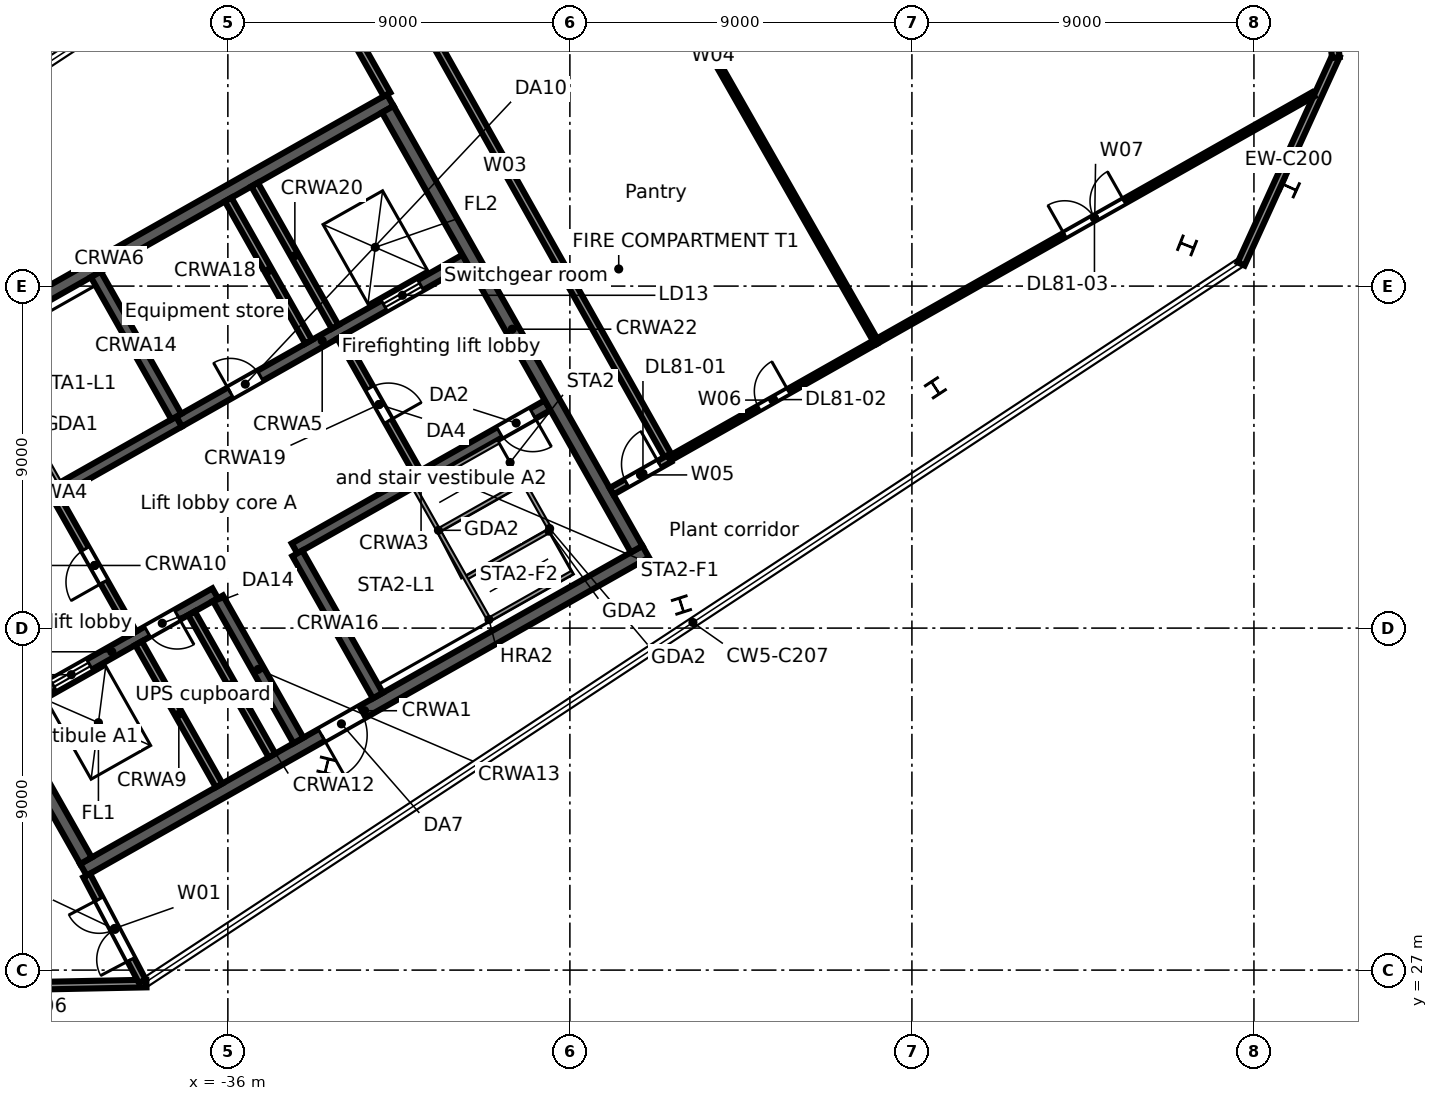
"""IFC4 building model, lengths in metres.
Left out: names, types, materials, properties, quantities, classifications, styles, units other than length and angle.
Written with IfcOpenShell. Run it as: python <this file> out.ifc"""

import sys

from ifc_helpers import new_model, si_unit, direction, frame, frame_2d, origin, origin_2d, place, context, subcontext, project, spatial, rectangle, i_section, extrude, element, fill, save


model = new_model("IFC4")
c1 = context("Model", 3, precision=1e-05, world=origin(), true_north=direction((0.0, 1.0)))
c2 = subcontext(c1, "Body", "Model", "MODEL_VIEW")
j1 = project(units=[si_unit("LENGTHUNIT", "METRE"), si_unit("PLANEANGLEUNIT", "RADIAN")], contexts=[c1])
p1 = place(None, origin())
s1 = spatial("IfcSite", under=j1, at=p1, CompositionType="ELEMENT")
p2 = place(p1, origin())
s2 = spatial("IfcBuilding", under=s1, at=p2, CompositionType="ELEMENT")
p3 = place(p2, frame((0.0, 0.0, 357.7)))
s3 = spatial("IfcBuildingStorey", under=s2, at=p3, CompositionType="ELEMENT", Elevation=357.7)
for number, where, z_axis, x_axis in (
    (1, (-8.058, 47.599, 0.0), (0.0, 0.0, 1.0), (0.415, 0.91, 0.0)),
    (2, (-33.4, 32.374, 0.0), (0.0, 0.0, 1.0), (-0.971, 0.239, 0.0)),
    (3, (-24.065, 36.607, 0.0), (0.0, 0.0, 1.0), (-0.952, -0.307, 0.0)),
    (4, (-17.382, 42.324, 0.0), (0.0, 0.0, 1.0), (0.836, 0.549, 0.0)),
):
    element("IfcColumn", number, at=place(p3, frame(where, z_axis=z_axis, x_axis=x_axis)), inside=s3, PredefinedType="COLUMN", context=c2, shape_type="SweptSolid", body=[
        extrude(i_section(OverallWidth=0.4, OverallDepth=0.4, WebThickness=0.013, FlangeThickness=0.021, FilletRadius=0.022, at=origin_2d()), origin(), (0.0, 0.0, 1.0), 3.3),
    ])
p4 = place(p3, frame((-10.76, 46.071, 0.0), z_axis=(0.0, 0.0, 1.0), x_axis=(0.369033125724, 0.929416242659, 0.0)))
e5 = element("IfcColumn", 5, at=p4, inside=s3, PredefinedType="COLUMN", context=c2, shape_type="SweptSolid", body=[
    extrude(i_section(OverallWidth=0.4, OverallDepth=0.4, WebThickness=0.013, FlangeThickness=0.021, FilletRadius=0.022, at=origin_2d()), origin(), (0.0, 0.0, 1.0), 3.6),
])
p5 = place(p3, frame((-6.834, 51.069, 0.0), z_axis=(0.0, 0.0, 1.0), x_axis=(-0.415043982488, -0.909801347878, 0.0)))
e6 = element("IfcWall", 6, at=p5, inside=s3, PredefinedType="STANDARD", context=c2, shape_type="SweptSolid", body=[
    extrude(rectangle(XDim=6.031, YDim=0.2, at=frame_2d((3.015, 0.0))), origin(), (0.0, 0.0, 1.0), 2.7),
])
p6 = place(p3, frame((-9.114, 67.947, 0.0), z_axis=(0.0, 0.0, 1.0), x_axis=(0.132931254717, -0.991125260257, 0.0)))
e7 = element("IfcWall", 7, at=p6, inside=s3, PredefinedType="STANDARD", context=c2, shape_type="SweptSolid", body=[
    extrude(rectangle(XDim=17.084, YDim=0.2, at=frame_2d((8.542, 0.0))), origin(), (0.0, 0.0, 1.0), 3.3),
])
p7 = place(p3, frame((-38.144, 26.646, 0.0), z_axis=(0.0, 0.0, 1.0), x_axis=(-0.999795108808, -0.020242045449, 0.0)))
e8 = element("IfcWall", 8, at=p7, inside=s3, PredefinedType="STANDARD", context=c2, shape_type="SweptSolid", body=[
    extrude(rectangle(XDim=6.031, YDim=0.2, at=frame_2d((3.015, 0.0))), origin(), (0.0, 0.0, 1.0), 3.3),
])
p8 = place(p3, frame((-39.801, 29.64, 0.0), z_axis=(0.0, 0.0, 1.0), x_axis=(0.870359753402, 0.492416388494, 0.0)))
e9 = element("IfcWall", 9, at=p8, inside=s3, PredefinedType="SOLIDWALL", context=c2, shape_type="SweptSolid", body=[
    extrude(rectangle(XDim=17.0, YDim=0.35, at=frame_2d((8.5, 0.0))), origin(), (0.0, 0.0, 1.0), 3.3),
])
p9 = place(p8, frame((7.2, 0.0, 0.0)))
e10 = element("IfcOpeningElement", 10, at=p9, cuts=e9, PredefinedType="OPENING", context=c2, shape_type="SweptSolid", body=[
    extrude(rectangle(XDim=1.2, YDim=2.1, at=frame_2d((0.6, 1.05))), frame((0.0, 0.185, 0.0), z_axis=(0.0, -1.0, 0.0), x_axis=(1.0, 0.0, 0.0)), (0.0, 0.0, 1.0), 0.37),
])
p10 = place(p3, frame((-41.774, 33.838, 0.0), z_axis=(0.0, 0.0, 1.0), x_axis=(0.870355415866, 0.492424055132, 0.0)))
e11 = element("IfcWall", 11, at=p10, inside=s3, PredefinedType="SOLIDWALL", context=c2, shape_type="SweptSolid", body=[
    extrude(rectangle(XDim=6.25, YDim=0.3, at=frame_2d((3.125, 0.0))), origin(), (0.0, 0.0, 1.0), 3.3),
])
p11 = place(p10, frame((1.35, 0.0, 0.0)))
e12 = element("IfcOpeningElement", 12, at=p11, cuts=e11, PredefinedType="OPENING", context=c2, shape_type="SweptSolid", body=[
    extrude(rectangle(XDim=1.1, YDim=2.1, at=frame_2d((0.55, 1.05))), frame((0.0, 0.16, 0.0), z_axis=(0.0, -1.0, 0.0), x_axis=(1.0, 0.0, 0.0)), (0.0, 0.0, 1.0), 0.32),
])
p12 = place(p10, frame((4.2, 0.0, 0.0)))
e13 = element("IfcOpeningElement", 13, at=p12, cuts=e11, PredefinedType="OPENING", context=c2, shape_type="SweptSolid", body=[
    extrude(rectangle(XDim=0.9, YDim=2.1, at=frame_2d((0.45, 1.05))), frame((0.0, 0.16, 0.0), z_axis=(0.0, -1.0, 0.0), x_axis=(1.0, 0.0, 0.0)), (0.0, 0.0, 1.0), 0.32),
])
p13 = place(p3, frame((-34.245, 38.097, 0.0), z_axis=(0.0, 0.0, 1.0), x_axis=(0.870352347706, 0.49242947804, 0.0)))
e14 = element("IfcWall", 14, at=p13, inside=s3, PredefinedType="SOLIDWALL", context=c2, shape_type="SweptSolid", body=[
    extrude(rectangle(XDim=7.65, YDim=0.3, at=frame_2d((3.825, 0.0))), origin(), (0.0, 0.0, 1.0), 3.3),
])
p14 = place(p13, frame((6.2, 0.0, 0.0)))
e15 = element("IfcOpeningElement", 15, at=p14, cuts=e14, PredefinedType="OPENING", context=c2, shape_type="SweptSolid", body=[
    extrude(rectangle(XDim=1.0, YDim=2.1, at=frame_2d((0.5, 1.05))), frame((0.0, 0.16, 0.0), z_axis=(0.0, -1.0, 0.0), x_axis=(1.0, 0.0, 0.0)), (0.0, 0.0, 1.0), 0.32),
])
p15 = place(p3, frame((-43.94, 37.667, 0.0), z_axis=(0.0, 0.0, 1.0), x_axis=(0.870352347706, 0.49242947804, 0.0)))
e16 = element("IfcWall", 16, at=p15, inside=s3, PredefinedType="SOLIDWALL", context=c2, shape_type="SweptSolid", body=[
    extrude(rectangle(XDim=7.65, YDim=0.3, at=frame_2d((3.825, 0.0))), origin(), (0.0, 0.0, 1.0), 3.3),
])
p16 = place(p15, frame((0.45, 0.0, 0.0)))
e17 = element("IfcOpeningElement", 17, at=p16, cuts=e16, PredefinedType="OPENING", context=c2, shape_type="SweptSolid", body=[
    extrude(rectangle(XDim=1.0, YDim=2.1, at=frame_2d((0.5, 1.05))), frame((0.0, 0.16, 0.0), z_axis=(0.0, -1.0, 0.0), x_axis=(1.0, 0.0, 0.0)), (0.0, 0.0, 1.0), 0.32),
])
p17 = place(p3, frame((-37.282, 41.435, 0.0), z_axis=(0.0, 0.0, 1.0), x_axis=(0.870364588774, 0.492407841741, 0.0)))
e18 = element("IfcWall", 18, at=p17, inside=s3, PredefinedType="SOLIDWALL", context=c2, shape_type="SweptSolid", body=[
    extrude(rectangle(XDim=8.65, YDim=0.3, at=frame_2d((4.325, 0.0))), origin(), (0.0, 0.0, 1.0), 3.3),
])
p18 = place(p17, frame((6.2, 0.0, 0.0)))
e19 = element("IfcOpeningElement", 19, at=p18, cuts=e18, PredefinedType="OPENING", context=c2, shape_type="SweptSolid", body=[
    extrude(rectangle(XDim=1.1, YDim=2.1, at=frame_2d((0.55, 1.05))), frame((0.0, 0.16, 0.0), z_axis=(0.0, -1.0, 0.0), x_axis=(1.0, 0.0, 0.0)), (0.0, 0.0, 1.0), 0.32),
])
p19 = place(p17, frame((1.55, 0.0, 0.0)))
e20 = element("IfcOpeningElement", 20, at=p19, cuts=e18, PredefinedType="OPENING", context=c2, shape_type="SweptSolid", body=[
    extrude(rectangle(XDim=0.9, YDim=2.1, at=frame_2d((0.45, 1.05))), frame((0.0, 0.16, 0.0), z_axis=(0.0, -1.0, 0.0), x_axis=(1.0, 0.0, 0.0)), (0.0, 0.0, 1.0), 0.32),
])
p20 = place(p3, frame((-46.522, 41.521, 0.0), z_axis=(0.0, 0.0, 1.0), x_axis=(0.870359753402, 0.492416388494, 0.0)))
e21 = element("IfcWall", 21, at=p20, inside=s3, PredefinedType="SOLIDWALL", context=c2, shape_type="SweptSolid", body=[
    extrude(rectangle(XDim=17.0, YDim=0.35, at=frame_2d((8.5, 0.0))), origin(), (0.0, 0.0, 1.0), 3.3),
])
p21 = place(p3, frame((-46.284, 41.454, 0.0), z_axis=(0.0, 0.0, 1.0), x_axis=(0.492429810477, -0.870352159619, 0.0)))
e22 = element("IfcWall", 22, at=p21, inside=s3, PredefinedType="SOLIDWALL", context=c2, shape_type="SweptSolid", body=[
    extrude(rectangle(XDim=13.3, YDim=0.35, at=frame_2d((6.65, 0.0))), origin(), (0.0, 0.0, 1.0), 3.3),
])
p22 = place(p3, frame((-38.349, 35.603, 0.0), z_axis=(0.0, 0.0, 1.0), x_axis=(0.492410799949, -0.870362915164, 0.0)))
e23 = element("IfcWall", 23, at=p22, inside=s3, PredefinedType="SOLIDWALL", context=c2, shape_type="SweptSolid", body=[
    extrude(rectangle(XDim=4.3, YDim=0.2, at=frame_2d((2.15, 0.0))), origin(), (0.0, 0.0, 1.0), 3.3),
])
p23 = place(p3, frame((-40.516, 39.433, 0.0), z_axis=(0.0, 0.0, 1.0), x_axis=(0.492453559952, -0.87033872216, 0.0)))
e24 = element("IfcWall", 24, at=p23, inside=s3, PredefinedType="PARTITIONING", context=c2, shape_type="SweptSolid", body=[
    extrude(rectangle(XDim=4.1, YDim=0.2, at=frame_2d((2.05, 0.0))), origin(), (0.0, 0.0, 1.0), 3.3),
])
p24 = place(p23, frame((1.55, 0.0, 0.0)))
e25 = element("IfcOpeningElement", 25, at=p24, cuts=e24, PredefinedType="OPENING", context=c2, shape_type="SweptSolid", body=[
    extrude(rectangle(XDim=1.0, YDim=2.1, at=frame_2d((0.5, 1.05))), frame((0.0, 0.11, 0.0), z_axis=(0.0, -1.0, 0.0), x_axis=(1.0, 0.0, 0.0)), (0.0, 0.0, 1.0), 0.22),
])
p25 = place(p3, frame((-36.956, 36.391, 0.0), z_axis=(0.0, 0.0, 1.0), x_axis=(0.492410799949, -0.870362915164, 0.0)))
e26 = element("IfcWall", 26, at=p25, inside=s3, PredefinedType="SOLIDWALL", context=c2, shape_type="SweptSolid", body=[
    extrude(rectangle(XDim=4.3, YDim=0.2, at=frame_2d((2.15, 0.0))), origin(), (0.0, 0.0, 1.0), 3.3),
])
p26 = place(p3, frame((-36.26, 36.785, 0.0), z_axis=(0.0, 0.0, 1.0), x_axis=(0.492435133428, -0.870349147967, 0.0)))
e27 = element("IfcWall", 27, at=p26, inside=s3, PredefinedType="SOLIDWALL", context=c2, shape_type="SweptSolid", body=[
    extrude(rectangle(XDim=4.3, YDim=0.3, at=frame_2d((2.15, 0.0))), origin(), (0.0, 0.0, 1.0), 3.3),
])
p27 = place(p3, frame((-39.473, 45.308, 0.0), z_axis=(0.0, 0.0, 1.0), x_axis=(0.492410799949, -0.870362915164, 0.0)))
e28 = element("IfcWall", 28, at=p27, inside=s3, PredefinedType="SOLIDWALL", context=c2, shape_type="SweptSolid", body=[
    extrude(rectangle(XDim=4.3, YDim=0.3, at=frame_2d((2.15, 0.0))), origin(), (0.0, 0.0, 1.0), 3.3),
])
p28 = place(p3, frame((-34.171, 37.967, 0.0), z_axis=(0.0, 0.0, 1.0), x_axis=(0.492435133428, -0.870349147967, 0.0)))
e29 = element("IfcWall", 29, at=p28, inside=s3, PredefinedType="SOLIDWALL", context=c2, shape_type="SweptSolid", body=[
    extrude(rectangle(XDim=4.3, YDim=0.3, at=frame_2d((2.15, 0.0))), origin(), (0.0, 0.0, 1.0), 3.3),
])
p29 = place(p3, frame((-35.992, 47.277, 0.0), z_axis=(0.0, 0.0, 1.0), x_axis=(0.492410799949, -0.870362915164, 0.0)))
e30 = element("IfcWall", 30, at=p29, inside=s3, PredefinedType="SOLIDWALL", context=c2, shape_type="SweptSolid", body=[
    extrude(rectangle(XDim=4.3, YDim=0.2, at=frame_2d((2.15, 0.0))), origin(), (0.0, 0.0, 1.0), 3.3),
])
p30 = place(p3, frame((-33.031, 43.667, 0.0), z_axis=(0.0, 0.0, 1.0), x_axis=(0.492408451753, -0.87036424366, 0.0)))
e31 = element("IfcWall", 31, at=p30, inside=s3, PredefinedType="PARTITIONING", context=c2, shape_type="SweptSolid", body=[
    extrude(rectangle(XDim=4.1, YDim=0.2, at=frame_2d((2.05, 0.0))), origin(), (0.0, 0.0, 1.0), 3.3),
])
p31 = place(p30, frame((1.55, 0.0, 0.0)))
e32 = element("IfcOpeningElement", 32, at=p31, cuts=e31, PredefinedType="OPENING", context=c2, shape_type="SweptSolid", body=[
    extrude(rectangle(XDim=1.0, YDim=2.1, at=frame_2d((0.5, 1.05))), frame((0.0, 0.11, 0.0), z_axis=(0.0, -1.0, 0.0), x_axis=(1.0, 0.0, 0.0)), (0.0, 0.0, 1.0), 0.22),
])
p32 = place(p3, frame((-35.296, 47.671, 0.0), z_axis=(0.0, 0.0, 1.0), x_axis=(0.492435133428, -0.870349147967, 0.0)))
e33 = element("IfcWall", 33, at=p32, inside=s3, PredefinedType="SOLIDWALL", context=c2, shape_type="SweptSolid", body=[
    extrude(rectangle(XDim=4.3, YDim=0.2, at=frame_2d((2.15, 0.0))), origin(), (0.0, 0.0, 1.0), 3.3),
])
p33 = place(p3, frame((-31.792, 49.653, 0.0), z_axis=(0.0, 0.0, 1.0), x_axis=(0.492421943245, -0.870356610712, 0.0)))
e34 = element("IfcWall", 34, at=p33, inside=s3, PredefinedType="SOLIDWALL", context=c2, shape_type="SweptSolid", body=[
    extrude(rectangle(XDim=13.3, YDim=0.35, at=frame_2d((6.65, 0.0))), origin(), (0.0, 0.0, 1.0), 3.3),
])
p34 = place(p3, frame((-39.715, 29.488, 0.0), z_axis=(0.0, 0.0, 1.0), x_axis=(0.465711249011, -0.884936739289, 0.0)))
e35 = element("IfcWall", 35, at=p34, inside=s3, PredefinedType="PARTITIONING", context=c2, shape_type="SweptSolid", body=[
    extrude(rectangle(XDim=3.146, YDim=0.2, at=frame_2d((1.573, 0.0))), origin(), (0.0, 0.0, 1.0), 2.68),
])
p35 = place(p34, frame((0.7, 0.0, 0.0)))
e36 = element("IfcOpeningElement", 36, at=p35, cuts=e35, PredefinedType="OPENING", context=c2, shape_type="SweptSolid", body=[
    extrude(rectangle(XDim=1.8, YDim=2.1, at=frame_2d((0.9, 1.05))), frame((0.0, 0.11, 0.0), z_axis=(0.0, -1.0, 0.0), x_axis=(1.0, 0.0, 0.0)), (0.0, 0.0, 1.0), 0.22),
])
p36 = place(p3, frame((-34.544, 54.873, 0.0), z_axis=(0.0, 0.0, 1.0), x_axis=(0.492390708412, -0.870374281714, 0.0)))
e37 = element("IfcWall", 37, at=p36, inside=s3, PredefinedType="PARTITIONING", context=c2, shape_type="SweptSolid", body=[
    extrude(rectangle(XDim=5.548, YDim=0.2, at=frame_2d((2.774, 0.0))), origin(), (0.0, 0.0, 1.0), 2.18),
])
p37 = place(p3, frame((-33.042, 55.86, 0.0), z_axis=(0.0, 0.0, 1.0), x_axis=(0.490288138745, -0.871560405828, 0.0)))
e38 = element("IfcWall", 38, at=p37, inside=s3, PredefinedType="PARTITIONING", context=c2, shape_type="SweptSolid", body=[
    extrude(rectangle(XDim=17.667, YDim=0.2, at=frame_2d((8.834, 0.0))), origin(), (0.0, 0.0, 1.0), 2.18),
])
p38 = place(p3, frame((-27.511, 58.564, 0.0), z_axis=(0.0, 0.0, 1.0), x_axis=(0.495459338806, -0.868631132063, 0.0)))
e39 = element("IfcWall", 39, at=p38, inside=s3, PredefinedType="PARTITIONING", context=c2, shape_type="SweptSolid", body=[
    extrude(rectangle(XDim=17.297, YDim=0.125, at=frame_2d((8.648, 0.0))), origin(), (0.0, 0.0, 1.0), 3.3),
])
p39 = place(p3, frame((-25.904, 39.6, 0.0), z_axis=(0.0, 0.0, 1.0), x_axis=(0.870482323294, 0.492199679838, 0.0)))
e40 = element("IfcWall", 40, at=p39, inside=s3, PredefinedType="PARTITIONING", context=c2, shape_type="SweptSolid", body=[
    extrude(rectangle(XDim=1.751, YDim=0.2, at=frame_2d((0.875, 0.0))), origin(), (0.0, 0.0, 1.0), 3.3),
])
p40 = place(p39, frame((0.45, 0.0, 0.0)))
e41 = element("IfcOpeningElement", 41, at=p40, cuts=e40, PredefinedType="OPENING", context=c2, shape_type="SweptSolid", body=[
    extrude(rectangle(XDim=1.0, YDim=2.1, at=frame_2d((0.5, 1.05))), frame((0.0, 0.11, 0.0), z_axis=(0.0, -1.0, 0.0), x_axis=(1.0, 0.0, 0.0)), (0.0, 0.0, 1.0), 0.22),
])
p41 = place(p3, frame((-24.38, 40.462, 0.0), z_axis=(0.0, 0.0, 1.0), x_axis=(0.87036048388, 0.492415097353, 0.0)))
e42 = element("IfcWall", 42, at=p41, inside=s3, PredefinedType="PARTITIONING", context=c2, shape_type="SweptSolid", body=[
    extrude(rectangle(XDim=6.249, YDim=0.125, at=frame_2d((3.125, 0.0))), origin(), (0.0, 0.0, 1.0), 3.3),
])
p42 = place(p41, frame((2.7, 0.0, 0.0)))
e43 = element("IfcOpeningElement", 43, at=p42, cuts=e42, PredefinedType="OPENING", context=c2, shape_type="SweptSolid", body=[
    extrude(rectangle(XDim=0.9, YDim=2.1, at=frame_2d((0.45, 1.05))), frame((0.0, 0.073, 0.0), z_axis=(0.0, -1.0, 0.0), x_axis=(1.0, 0.0, 0.0)), (0.0, 0.0, 1.0), 0.145),
])
p43 = place(p3, frame((-18.941, 43.539, 0.0), z_axis=(0.0, 0.0, 1.0), x_axis=(0.870355301806, 0.492424256733, 0.0)))
e44 = element("IfcWall", 44, at=p43, inside=s3, PredefinedType="PARTITIONING", context=c2, shape_type="SweptSolid", body=[
    extrude(rectangle(XDim=13.216, YDim=0.125, at=frame_2d((6.608, 0.0))), origin(), (0.0, 0.0, 1.0), 2.68),
])
p44 = place(p43, frame((5.7, 0.0, 0.0)))
e45 = element("IfcOpeningElement", 45, at=p44, cuts=e44, PredefinedType="OPENING", context=c2, shape_type="SweptSolid", body=[
    extrude(rectangle(XDim=1.8, YDim=2.1, at=frame_2d((0.9, 1.05))), frame((0.0, 0.073, 0.0), z_axis=(0.0, -1.0, 0.0), x_axis=(1.0, 0.0, 0.0)), (0.0, 0.0, 1.0), 0.145),
])
p45 = place(p18, origin())
e46 = element("IfcDoor", 46, at=p45, inside=s3, OperationType="DOUBLE_DOOR_SLIDING", PredefinedType="DOOR", context=c2, shape_type="SweptSolid", body=[
    extrude(rectangle(XDim=1.1, YDim=2.1, at=frame_2d((0.55, 1.05))), frame((0.0, 0.025, 0.0), z_axis=(0.0, -1.0, 0.0), x_axis=(1.0, 0.0, 0.0)), (0.0, 0.0, 1.0), 0.05),
])
fill(e19, e46)
p46 = place(p11, origin())
e47 = element("IfcDoor", 47, at=p46, inside=s3, OperationType="DOUBLE_DOOR_SLIDING", PredefinedType="DOOR", context=c2, shape_type="SweptSolid", body=[
    extrude(rectangle(XDim=1.1, YDim=2.1, at=frame_2d((0.55, 1.05))), frame((0.0, 0.025, 0.0), z_axis=(0.0, -1.0, 0.0), x_axis=(1.0, 0.0, 0.0)), (0.0, 0.0, 1.0), 0.05),
])
fill(e12, e47)
p47 = place(p14, frame((1.0, 0.0, 0.0), z_axis=(0.0, 0.0, 1.0), x_axis=(-1.0, 0.0, 0.0)))
e48 = element("IfcDoor", 48, at=p47, inside=s3, OperationType="SINGLE_SWING_LEFT", PredefinedType="DOOR", context=c2, shape_type="SweptSolid", body=[
    extrude(rectangle(XDim=1.0, YDim=2.1, at=frame_2d((0.5, 1.05))), frame((0.0, 0.025, 0.0), z_axis=(0.0, -1.0, 0.0), x_axis=(1.0, 0.0, 0.0)), (0.0, 0.0, 1.0), 0.05),
])
fill(e15, e48)
p48 = place(p24, frame((1.0, 0.0, 0.0), z_axis=(0.0, 0.0, 1.0), x_axis=(-1.0, 0.0, 0.0)))
e49 = element("IfcDoor", 49, at=p48, inside=s3, OperationType="SINGLE_SWING_LEFT", PredefinedType="DOOR", context=c2, shape_type="SweptSolid", body=[
    extrude(rectangle(XDim=1.0, YDim=2.1, at=frame_2d((0.5, 1.05))), frame((0.0, 0.025, 0.0), z_axis=(0.0, -1.0, 0.0), x_axis=(1.0, 0.0, 0.0)), (0.0, 0.0, 1.0), 0.05),
])
fill(e25, e49)
p49 = place(p31, origin())
e50 = element("IfcDoor", 50, at=p49, inside=s3, OperationType="SINGLE_SWING_RIGHT", PredefinedType="DOOR", context=c2, shape_type="SweptSolid", body=[
    extrude(rectangle(XDim=1.0, YDim=2.1, at=frame_2d((0.5, 1.05))), frame((0.0, 0.025, 0.0), z_axis=(0.0, -1.0, 0.0), x_axis=(1.0, 0.0, 0.0)), (0.0, 0.0, 1.0), 0.05),
])
fill(e32, e50)
p50 = place(p9, frame((1.2, 0.0, 0.0), z_axis=(0.0, 0.0, 1.0), x_axis=(-1.0, 0.0, 0.0)))
e51 = element("IfcDoor", 51, at=p50, inside=s3, OperationType="SINGLE_SWING_RIGHT", PredefinedType="DOOR", context=c2, shape_type="SweptSolid", body=[
    extrude(rectangle(XDim=1.2, YDim=2.1, at=frame_2d((0.6, 1.05))), frame((0.0, 0.025, 0.0), z_axis=(0.0, -1.0, 0.0), x_axis=(1.0, 0.0, 0.0)), (0.0, 0.0, 1.0), 0.05),
])
fill(e10, e51)
p51 = place(p19, origin())
e52 = element("IfcDoor", 52, at=p51, inside=s3, OperationType="SINGLE_SWING_LEFT", PredefinedType="DOOR", context=c2, shape_type="SweptSolid", body=[
    extrude(rectangle(XDim=0.9, YDim=2.1, at=frame_2d((0.45, 1.05))), frame((0.0, 0.025, 0.0), z_axis=(0.0, -1.0, 0.0), x_axis=(1.0, 0.0, 0.0)), (0.0, 0.0, 1.0), 0.05),
])
fill(e20, e52)
p52 = place(p12, frame((0.9, 0.0, 0.0), z_axis=(0.0, 0.0, 1.0), x_axis=(-1.0, 0.0, 0.0)))
e53 = element("IfcDoor", 53, at=p52, inside=s3, OperationType="SINGLE_SWING_LEFT", PredefinedType="DOOR", context=c2, shape_type="SweptSolid", body=[
    extrude(rectangle(XDim=0.9, YDim=2.1, at=frame_2d((0.45, 1.05))), frame((0.0, 0.025, 0.0), z_axis=(0.0, -1.0, 0.0), x_axis=(1.0, 0.0, 0.0)), (0.0, 0.0, 1.0), 0.05),
])
fill(e13, e53)
p53 = place(p40, origin())
e54 = element("IfcDoor", 54, at=p53, inside=s3, OperationType="SINGLE_SWING_RIGHT", PredefinedType="DOOR", context=c2, shape_type="SweptSolid", body=[
    extrude(rectangle(XDim=1.0, YDim=2.1, at=frame_2d((0.5, 1.05))), frame((0.0, 0.025, 0.0), z_axis=(0.0, -1.0, 0.0), x_axis=(1.0, 0.0, 0.0)), (0.0, 0.0, 1.0), 0.05),
])
fill(e41, e54)
p54 = place(p42, origin())
e55 = element("IfcDoor", 55, at=p54, inside=s3, OperationType="SINGLE_SWING_RIGHT", PredefinedType="DOOR", context=c2, shape_type="SweptSolid", body=[
    extrude(rectangle(XDim=0.9, YDim=2.1, at=frame_2d((0.45, 1.05))), frame((0.0, 0.025, 0.0), z_axis=(0.0, -1.0, 0.0), x_axis=(1.0, 0.0, 0.0)), (0.0, 0.0, 1.0), 0.05),
])
fill(e43, e55)
p55 = place(p44, origin())
e56 = element("IfcDoor", 56, at=p55, inside=s3, OperationType="DOUBLE_DOOR_SINGLE_SWING", PredefinedType="DOOR", context=c2, shape_type="SweptSolid", body=[
    extrude(rectangle(XDim=1.8, YDim=2.1, at=frame_2d((0.9, 1.05))), frame((0.0, 0.025, 0.0), z_axis=(0.0, -1.0, 0.0), x_axis=(1.0, 0.0, 0.0)), (0.0, 0.0, 1.0), 0.05),
])
fill(e45, e56)
p56 = place(p35, frame((1.8, 0.0, 0.0), z_axis=(0.0, 0.0, 1.0), x_axis=(-1.0, 0.0, 0.0)))
e57 = element("IfcDoor", 57, at=p56, inside=s3, OperationType="DOUBLE_DOOR_SINGLE_SWING", PredefinedType="DOOR", context=c2, shape_type="SweptSolid", body=[
    extrude(rectangle(XDim=1.8, YDim=2.1, at=frame_2d((0.9, 1.05))), frame((0.0, 0.025, 0.0), z_axis=(0.0, -1.0, 0.0), x_axis=(1.0, 0.0, 0.0)), (0.0, 0.0, 1.0), 0.05),
])
fill(e36, e57)
save(model, sys.argv[1])
